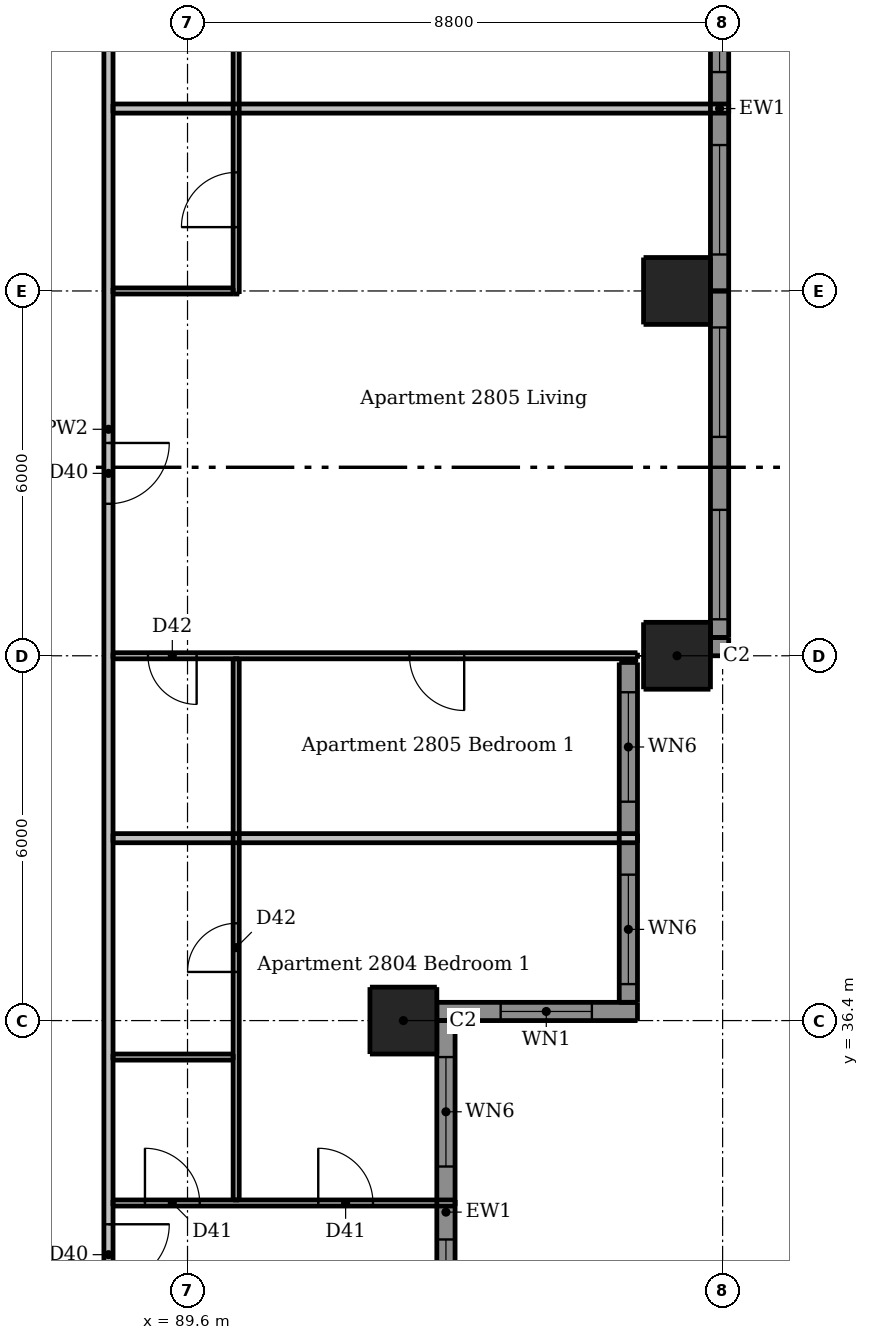
"""IFC4 building model, lengths in metres.
Left out: names, types, materials, properties, quantities, classifications, styles, units other than length and angle.
Written with IfcOpenShell. Run it as: python <this file> out.ifc"""

import sys

from ifc_helpers import new_model, si_unit, direction, frame, frame_2d, origin, origin_2d, place, context, subcontext, project, spatial, rectangle, extrude, element, fill, save


model = new_model("IFC4")
c1 = context("Model", 3, precision=1e-05, world=origin(), true_north=direction((0.0, 1.0)))
c2 = subcontext(c1, "Body", "Model", "MODEL_VIEW")
j1 = project(units=[si_unit("LENGTHUNIT", "METRE"), si_unit("PLANEANGLEUNIT", "RADIAN")], contexts=[c1])
p1 = place(None, origin())
s1 = spatial("IfcSite", under=j1, at=p1, CompositionType="ELEMENT")
p2 = place(p1, origin())
s2 = spatial("IfcBuilding", under=s1, at=p2, CompositionType="ELEMENT")
p3 = place(p2, frame((0.0, 0.0, 105.1)))
s3 = spatial("IfcBuildingStorey", under=s2, at=p3, CompositionType="ELEMENT", Elevation=105.1)
p4 = place(p3, frame((93.15, 36.4, 0.0), z_axis=(0.0, 0.0, 1.0), x_axis=(1.0, 0.0, 0.0)))
e1 = element("IfcColumn", 1, at=p4, inside=s3, PredefinedType="COLUMN", context=c2, shape_type="SweptSolid", body=[
    extrude(rectangle(XDim=1.1, YDim=1.1, at=origin_2d()), origin(), (0.0, 0.0, 1.0), 3.05),
])
for number, where, z_axis, x_axis in (
    (2, (97.65, 42.4, 0.0), (0.0, 0.0, 1.0), (1.0, 0.0, 0.0)),
    (3, (97.65, 48.4, 0.0), (0.0, 0.0, 1.0), (1.0, 0.0, 0.0)),
):
    element("IfcColumn", number, at=place(p3, frame(where, z_axis=z_axis, x_axis=x_axis)), inside=s3, PredefinedType="COLUMN", context=c2, shape_type="SweptSolid", body=[
        extrude(rectangle(XDim=1.1, YDim=1.1, at=origin_2d()), origin(), (0.0, 0.0, 1.0), 3.3),
    ])
p5 = place(p3, frame((93.7, 36.55, 0.0), z_axis=(0.0, 0.0, 1.0), x_axis=(1.0, 0.0, 0.0)))
e4 = element("IfcWall", 4, at=p5, inside=s3, PredefinedType="SOLIDWALL", context=c2, shape_type="SweptSolid", body=[
    extrude(rectangle(XDim=3.3, YDim=0.3, at=frame_2d((1.65, 0.0))), origin(), (0.0, 0.0, 1.0), 3.05),
])
p6 = place(p5, frame((1.05, 0.0, 0.9)))
e5 = element("IfcOpeningElement", 5, at=p6, cuts=e4, PredefinedType="OPENING", context=c2, shape_type="SweptSolid", body=[
    extrude(rectangle(XDim=1.5, YDim=1.5, at=frame_2d((0.75, 0.75))), frame((0.0, 0.16, 0.0), z_axis=(0.0, -1.0, 0.0), x_axis=(1.0, 0.0, 0.0)), (0.0, 0.0, 1.0), 0.32),
])
p7 = place(p3, frame((98.2, 42.55, 0.0), z_axis=(0.0, 0.0, 1.0), x_axis=(1.0, 0.0, 0.0)))
e6 = element("IfcWall", 6, at=p7, inside=s3, PredefinedType="SOLIDWALL", context=c2, shape_type="SweptSolid", body=[
    extrude(rectangle(XDim=0.3, YDim=0.3, at=frame_2d((0.15, 0.0))), origin(), (0.0, 0.0, 1.0), 3.05),
])
p8 = place(p3, frame((93.85, 30.1, 0.0), z_axis=(0.0, 0.0, 1.0), x_axis=(0.0, 1.0, 0.0)))
e7 = element("IfcWall", 7, at=p8, inside=s3, PredefinedType="SOLIDWALL", context=c2, shape_type="SweptSolid", body=[
    extrude(rectangle(XDim=6.3, YDim=0.3, at=frame_2d((3.15, 0.0))), origin(), (0.0, 0.0, 1.0), 3.05),
])
p9 = place(p8, frame((0.9, 0.0, 0.15)))
e8 = element("IfcOpeningElement", 8, at=p9, cuts=e7, PredefinedType="OPENING", context=c2, shape_type="SweptSolid", body=[
    extrude(rectangle(XDim=1.8, YDim=2.1, at=frame_2d((0.9, 1.05))), frame((0.0, 0.16, 0.0), z_axis=(0.0, -1.0, 0.0), x_axis=(1.0, 0.0, 0.0)), (0.0, 0.0, 1.0), 0.32),
])
p10 = place(p8, frame((3.9, 0.0, 0.15)))
e9 = element("IfcOpeningElement", 9, at=p10, cuts=e7, PredefinedType="OPENING", context=c2, shape_type="SweptSolid", body=[
    extrude(rectangle(XDim=1.8, YDim=2.1, at=frame_2d((0.9, 1.05))), frame((0.0, 0.16, 0.0), z_axis=(0.0, -1.0, 0.0), x_axis=(1.0, 0.0, 0.0)), (0.0, 0.0, 1.0), 0.32),
])
p11 = place(p3, frame((96.85, 36.7, 0.0), z_axis=(0.0, 0.0, 1.0), x_axis=(0.0, 1.0, 0.0)))
e10 = element("IfcWall", 10, at=p11, inside=s3, PredefinedType="SOLIDWALL", context=c2, shape_type="SweptSolid", body=[
    extrude(rectangle(XDim=5.59, YDim=0.3, at=frame_2d((2.795, 0.0))), origin(), (0.0, 0.0, 1.0), 3.05),
])
p12 = place(p11, frame((0.3, 0.0, 0.15)))
e11 = element("IfcOpeningElement", 11, at=p12, cuts=e10, PredefinedType="OPENING", context=c2, shape_type="SweptSolid", body=[
    extrude(rectangle(XDim=1.8, YDim=2.1, at=frame_2d((0.9, 1.05))), frame((0.0, 0.16, 0.0), z_axis=(0.0, -1.0, 0.0), x_axis=(1.0, 0.0, 0.0)), (0.0, 0.0, 1.0), 0.32),
])
p13 = place(p11, frame((3.3, 0.0, 0.15)))
e12 = element("IfcOpeningElement", 12, at=p13, cuts=e10, PredefinedType="OPENING", context=c2, shape_type="SweptSolid", body=[
    extrude(rectangle(XDim=1.8, YDim=2.1, at=frame_2d((0.9, 1.05))), frame((0.0, 0.16, 0.0), z_axis=(0.0, -1.0, 0.0), x_axis=(1.0, 0.0, 0.0)), (0.0, 0.0, 1.0), 0.32),
])
p14 = place(p3, frame((98.35, 42.7, 0.0), z_axis=(0.0, 0.0, 1.0), x_axis=(0.0, 1.0, 0.0)))
e13 = element("IfcWall", 13, at=p14, inside=s3, PredefinedType="SOLIDWALL", context=c2, shape_type="SweptSolid", body=[
    extrude(rectangle(XDim=5.7, YDim=0.3, at=frame_2d((2.85, 0.0))), origin(), (0.0, 0.0, 1.0), 3.05),
])
p15 = place(p14, frame((0.3, 0.0, 0.15)))
e14 = element("IfcOpeningElement", 14, at=p15, cuts=e13, PredefinedType="OPENING", context=c2, shape_type="SweptSolid", body=[
    extrude(rectangle(XDim=1.8, YDim=2.1, at=frame_2d((0.9, 1.05))), frame((0.0, 0.16, 0.0), z_axis=(0.0, -1.0, 0.0), x_axis=(1.0, 0.0, 0.0)), (0.0, 0.0, 1.0), 0.32),
])
p16 = place(p14, frame((3.3, 0.0, 0.15)))
e15 = element("IfcOpeningElement", 15, at=p16, cuts=e13, PredefinedType="OPENING", context=c2, shape_type="SweptSolid", body=[
    extrude(rectangle(XDim=1.8, YDim=2.1, at=frame_2d((0.9, 1.05))), frame((0.0, 0.16, 0.0), z_axis=(0.0, -1.0, 0.0), x_axis=(1.0, 0.0, 0.0)), (0.0, 0.0, 1.0), 0.32),
])
p17 = place(p3, frame((98.35, 48.4, 0.0), z_axis=(0.0, 0.0, 1.0), x_axis=(0.0, 1.0, 0.0)))
e16 = element("IfcWall", 16, at=p17, inside=s3, PredefinedType="SOLIDWALL", context=c2, shape_type="SweptSolid", body=[
    extrude(rectangle(XDim=6.0, YDim=0.3, at=frame_2d((3.0, 0.0))), origin(), (0.0, 0.0, 1.0), 3.05),
])
p18 = place(p17, frame((0.6, 0.0, 0.15)))
e17 = element("IfcOpeningElement", 17, at=p18, cuts=e16, PredefinedType="OPENING", context=c2, shape_type="SweptSolid", body=[
    extrude(rectangle(XDim=1.8, YDim=2.1, at=frame_2d((0.9, 1.05))), frame((0.0, 0.16, 0.0), z_axis=(0.0, -1.0, 0.0), x_axis=(1.0, 0.0, 0.0)), (0.0, 0.0, 1.0), 0.32),
])
p19 = place(p17, frame((3.6, 0.0, 0.15)))
e18 = element("IfcOpeningElement", 18, at=p19, cuts=e16, PredefinedType="OPENING", context=c2, shape_type="SweptSolid", body=[
    extrude(rectangle(XDim=1.8, YDim=2.1, at=frame_2d((0.9, 1.05))), frame((0.0, 0.16, 0.0), z_axis=(0.0, -1.0, 0.0), x_axis=(1.0, 0.0, 0.0)), (0.0, 0.0, 1.0), 0.32),
])
p20 = place(p3, frame((90.4, 33.45, 0.0), z_axis=(0.0, 0.0, 1.0), x_axis=(0.0, 1.0, 0.0)))
e19 = element("IfcWall", 19, at=p20, inside=s3, PredefinedType="PARTITIONING", context=c2, shape_type="SweptSolid", body=[
    extrude(rectangle(XDim=8.9, YDim=0.1, at=frame_2d((4.45, 0.0))), origin(), (0.0, 0.0, 1.0), 3.05),
])
p21 = place(p20, frame((3.75, 0.0, 0.0)))
e20 = element("IfcOpeningElement", 20, at=p21, cuts=e19, PredefinedType="OPENING", context=c2, shape_type="SweptSolid", body=[
    extrude(rectangle(XDim=0.8, YDim=2.1, at=frame_2d((0.4, 1.05))), frame((0.0, 0.06, 0.0), z_axis=(0.0, -1.0, 0.0), x_axis=(1.0, 0.0, 0.0)), (0.0, 0.0, 1.0), 0.12),
])
p22 = place(p3, frame((90.4, 48.35, 0.0), z_axis=(0.0, 0.0, 1.0), x_axis=(0.0, 1.0, 0.0)))
e21 = element("IfcWall", 21, at=p22, inside=s3, PredefinedType="PARTITIONING", context=c2, shape_type="SweptSolid", body=[
    extrude(rectangle(XDim=6.0, YDim=0.1, at=frame_2d((3.0, 0.0))), origin(), (0.0, 0.0, 1.0), 3.05),
])
p23 = place(p22, frame((1.1, 0.0, 0.0)))
e22 = element("IfcOpeningElement", 22, at=p23, cuts=e21, PredefinedType="OPENING", context=c2, shape_type="SweptSolid", body=[
    extrude(rectangle(XDim=0.9, YDim=2.1, at=frame_2d((0.45, 1.05))), frame((0.0, 0.06, 0.0), z_axis=(0.0, -1.0, 0.0), x_axis=(1.0, 0.0, 0.0)), (0.0, 0.0, 1.0), 0.12),
])
p24 = place(p3, frame((88.375, 48.4, 0.0), z_axis=(0.0, 0.0, 1.0), x_axis=(1.0, 0.0, 0.0)))
e23 = element("IfcWall", 23, at=p24, inside=s3, PredefinedType="PARTITIONING", context=c2, shape_type="SweptSolid", body=[
    extrude(rectangle(XDim=1.975, YDim=0.1, at=frame_2d((0.988, 0.0))), origin(), (0.0, 0.0, 1.0), 2.516),
])
p25 = place(p3, frame((97.0, 42.4, 0.0), z_axis=(0.0, 0.0, 1.0), x_axis=(-1.0, 0.0, 0.0)))
e24 = element("IfcWall", 24, at=p25, inside=s3, PredefinedType="PARTITIONING", context=c2, shape_type="SweptSolid", body=[
    extrude(rectangle(XDim=8.625, YDim=0.1, at=frame_2d((4.312, 0.0))), origin(), (0.0, 0.0, 1.0), 2.516),
])
p26 = place(p25, frame((2.85, 0.0, 0.0)))
e25 = element("IfcOpeningElement", 25, at=p26, cuts=e24, PredefinedType="OPENING", context=c2, shape_type="SweptSolid", body=[
    extrude(rectangle(XDim=0.9, YDim=2.1, at=frame_2d((0.45, 1.05))), frame((0.0, 0.06, 0.0), z_axis=(0.0, -1.0, 0.0), x_axis=(1.0, 0.0, 0.0)), (0.0, 0.0, 1.0), 0.12),
])
p27 = place(p25, frame((7.25, 0.0, 0.0)))
e26 = element("IfcOpeningElement", 26, at=p27, cuts=e24, PredefinedType="OPENING", context=c2, shape_type="SweptSolid", body=[
    extrude(rectangle(XDim=0.8, YDim=2.1, at=frame_2d((0.4, 1.05))), frame((0.0, 0.06, 0.0), z_axis=(0.0, -1.0, 0.0), x_axis=(1.0, 0.0, 0.0)), (0.0, 0.0, 1.0), 0.12),
])
p28 = place(p3, frame((88.375, 35.8, 0.0), z_axis=(0.0, 0.0, 1.0), x_axis=(1.0, 0.0, 0.0)))
e27 = element("IfcWall", 27, at=p28, inside=s3, PredefinedType="PARTITIONING", context=c2, shape_type="SweptSolid", body=[
    extrude(rectangle(XDim=1.975, YDim=0.1, at=frame_2d((0.988, 0.0))), origin(), (0.0, 0.0, 1.0), 3.05),
])
p29 = place(p3, frame((88.375, 33.4, 0.0), z_axis=(0.0, 0.0, 1.0), x_axis=(1.0, 0.0, 0.0)))
e28 = element("IfcWall", 28, at=p29, inside=s3, PredefinedType="PARTITIONING", context=c2, shape_type="SweptSolid", body=[
    extrude(rectangle(XDim=5.625, YDim=0.1, at=frame_2d((2.812, 0.0))), origin(), (0.0, 0.0, 1.0), 3.05),
])
p30 = place(p29, frame((0.525, 0.0, 0.0)))
e29 = element("IfcOpeningElement", 29, at=p30, cuts=e28, PredefinedType="OPENING", context=c2, shape_type="SweptSolid", body=[
    extrude(rectangle(XDim=0.9, YDim=2.1, at=frame_2d((0.45, 1.05))), frame((0.0, 0.06, 0.0), z_axis=(0.0, -1.0, 0.0), x_axis=(1.0, 0.0, 0.0)), (0.0, 0.0, 1.0), 0.12),
])
p31 = place(p29, frame((3.375, 0.0, 0.0)))
e30 = element("IfcOpeningElement", 30, at=p31, cuts=e28, PredefinedType="OPENING", context=c2, shape_type="SweptSolid", body=[
    extrude(rectangle(XDim=0.9, YDim=2.1, at=frame_2d((0.45, 1.05))), frame((0.0, 0.06, 0.0), z_axis=(0.0, -1.0, 0.0), x_axis=(1.0, 0.0, 0.0)), (0.0, 0.0, 1.0), 0.12),
])
p32 = place(p3, frame((88.3, 60.475, 0.0), z_axis=(0.0, 0.0, 1.0), x_axis=(0.0, -1.0, 0.0)))
e31 = element("IfcWall", 31, at=p32, inside=s3, PredefinedType="PARTITIONING", context=c2, shape_type="SweptSolid", body=[
    extrude(rectangle(XDim=28.7, YDim=0.15, at=frame_2d((14.35, 0.0))), origin(), (0.0, 0.0, 1.0), 3.05),
])
p33 = place(p32, frame((27.425, 0.0, 0.0)))
e32 = element("IfcOpeningElement", 32, at=p33, cuts=e31, PredefinedType="OPENING", context=c2, shape_type="SweptSolid", body=[
    extrude(rectangle(XDim=1.0, YDim=2.1, at=frame_2d((0.5, 1.05))), frame((0.0, 0.085, 0.0), z_axis=(0.0, -1.0, 0.0), x_axis=(1.0, 0.0, 0.0)), (0.0, 0.0, 1.0), 0.17),
])
p34 = place(p32, frame((14.575, 0.0, 0.0)))
e33 = element("IfcOpeningElement", 33, at=p34, cuts=e31, PredefinedType="OPENING", context=c2, shape_type="SweptSolid", body=[
    extrude(rectangle(XDim=1.0, YDim=2.1, at=frame_2d((0.5, 1.05))), frame((0.0, 0.085, 0.0), z_axis=(0.0, -1.0, 0.0), x_axis=(1.0, 0.0, 0.0)), (0.0, 0.0, 1.0), 0.17),
])
p35 = place(p32, frame((3.775, 0.0, 0.0)))
e34 = element("IfcOpeningElement", 34, at=p35, cuts=e31, PredefinedType="OPENING", context=c2, shape_type="SweptSolid", body=[
    extrude(rectangle(XDim=1.0, YDim=2.1, at=frame_2d((0.5, 1.05))), frame((0.0, 0.085, 0.0), z_axis=(0.0, -1.0, 0.0), x_axis=(1.0, 0.0, 0.0)), (0.0, 0.0, 1.0), 0.17),
])
p36 = place(p3, frame((88.375, 51.4, 0.0), z_axis=(0.0, 0.0, 1.0), x_axis=(1.0, 0.0, 0.0)))
e35 = element("IfcWall", 35, at=p36, inside=s3, PredefinedType="PARTITIONING", context=c2, shape_type="SweptSolid", body=[
    extrude(rectangle(XDim=10.125, YDim=0.15, at=frame_2d((5.062, 0.0))), origin(), (0.0, 0.0, 1.0), 3.05),
])
p37 = place(p3, frame((88.375, 39.4, 0.0), z_axis=(0.0, 0.0, 1.0), x_axis=(1.0, 0.0, 0.0)))
e36 = element("IfcWall", 36, at=p37, inside=s3, PredefinedType="PARTITIONING", context=c2, shape_type="SweptSolid", body=[
    extrude(rectangle(XDim=8.625, YDim=0.15, at=frame_2d((4.312, 0.0))), origin(), (0.0, 0.0, 1.0), 3.05),
])
p38 = place(p6, origin())
e37 = element("IfcWindow", 37, at=p38, inside=s3, PartitioningType="DOUBLE_PANEL_VERTICAL", PredefinedType="WINDOW", context=c2, shape_type="SweptSolid", body=[
    extrude(rectangle(XDim=1.5, YDim=1.5, at=frame_2d((0.75, 0.75))), frame((0.0, 0.03, 0.0), z_axis=(0.0, -1.0, 0.0), x_axis=(1.0, 0.0, 0.0)), (0.0, 0.0, 1.0), 0.06),
])
fill(e5, e37)
p39 = place(p9, origin())
e38 = element("IfcWindow", 38, at=p39, inside=s3, PartitioningType="DOUBLE_PANEL_VERTICAL", PredefinedType="WINDOW", context=c2, shape_type="SweptSolid", body=[
    extrude(rectangle(XDim=1.8, YDim=2.1, at=frame_2d((0.9, 1.05))), frame((0.0, 0.03, 0.0), z_axis=(0.0, -1.0, 0.0), x_axis=(1.0, 0.0, 0.0)), (0.0, 0.0, 1.0), 0.06),
])
fill(e8, e38)
p40 = place(p10, origin())
e39 = element("IfcWindow", 39, at=p40, inside=s3, PartitioningType="DOUBLE_PANEL_VERTICAL", PredefinedType="WINDOW", context=c2, shape_type="SweptSolid", body=[
    extrude(rectangle(XDim=1.8, YDim=2.1, at=frame_2d((0.9, 1.05))), frame((0.0, 0.03, 0.0), z_axis=(0.0, -1.0, 0.0), x_axis=(1.0, 0.0, 0.0)), (0.0, 0.0, 1.0), 0.06),
])
fill(e9, e39)
p41 = place(p12, origin())
e40 = element("IfcWindow", 40, at=p41, inside=s3, PartitioningType="DOUBLE_PANEL_VERTICAL", PredefinedType="WINDOW", context=c2, shape_type="SweptSolid", body=[
    extrude(rectangle(XDim=1.8, YDim=2.1, at=frame_2d((0.9, 1.05))), frame((0.0, 0.03, 0.0), z_axis=(0.0, -1.0, 0.0), x_axis=(1.0, 0.0, 0.0)), (0.0, 0.0, 1.0), 0.06),
])
fill(e11, e40)
p42 = place(p13, origin())
e41 = element("IfcWindow", 41, at=p42, inside=s3, PartitioningType="DOUBLE_PANEL_VERTICAL", PredefinedType="WINDOW", context=c2, shape_type="SweptSolid", body=[
    extrude(rectangle(XDim=1.8, YDim=2.1, at=frame_2d((0.9, 1.05))), frame((0.0, 0.03, 0.0), z_axis=(0.0, -1.0, 0.0), x_axis=(1.0, 0.0, 0.0)), (0.0, 0.0, 1.0), 0.06),
])
fill(e12, e41)
p43 = place(p15, origin())
e42 = element("IfcWindow", 42, at=p43, inside=s3, PartitioningType="DOUBLE_PANEL_VERTICAL", PredefinedType="WINDOW", context=c2, shape_type="SweptSolid", body=[
    extrude(rectangle(XDim=1.8, YDim=2.1, at=frame_2d((0.9, 1.05))), frame((0.0, 0.03, 0.0), z_axis=(0.0, -1.0, 0.0), x_axis=(1.0, 0.0, 0.0)), (0.0, 0.0, 1.0), 0.06),
])
fill(e14, e42)
p44 = place(p16, origin())
e43 = element("IfcWindow", 43, at=p44, inside=s3, PartitioningType="DOUBLE_PANEL_VERTICAL", PredefinedType="WINDOW", context=c2, shape_type="SweptSolid", body=[
    extrude(rectangle(XDim=1.8, YDim=2.1, at=frame_2d((0.9, 1.05))), frame((0.0, 0.03, 0.0), z_axis=(0.0, -1.0, 0.0), x_axis=(1.0, 0.0, 0.0)), (0.0, 0.0, 1.0), 0.06),
])
fill(e15, e43)
p45 = place(p18, origin())
e44 = element("IfcWindow", 44, at=p45, inside=s3, PartitioningType="DOUBLE_PANEL_VERTICAL", PredefinedType="WINDOW", context=c2, shape_type="SweptSolid", body=[
    extrude(rectangle(XDim=1.8, YDim=2.1, at=frame_2d((0.9, 1.05))), frame((0.0, 0.03, 0.0), z_axis=(0.0, -1.0, 0.0), x_axis=(1.0, 0.0, 0.0)), (0.0, 0.0, 1.0), 0.06),
])
fill(e17, e44)
p46 = place(p19, origin())
e45 = element("IfcWindow", 45, at=p46, inside=s3, PartitioningType="DOUBLE_PANEL_VERTICAL", PredefinedType="WINDOW", context=c2, shape_type="SweptSolid", body=[
    extrude(rectangle(XDim=1.8, YDim=2.1, at=frame_2d((0.9, 1.05))), frame((0.0, 0.03, 0.0), z_axis=(0.0, -1.0, 0.0), x_axis=(1.0, 0.0, 0.0)), (0.0, 0.0, 1.0), 0.06),
])
fill(e18, e45)
p47 = place(p33, origin())
e46 = element("IfcDoor", 46, at=p47, inside=s3, OperationType="SINGLE_SWING_LEFT", PredefinedType="DOOR", context=c2, shape_type="SweptSolid", body=[
    extrude(rectangle(XDim=1.0, YDim=2.1, at=frame_2d((0.5, 1.05))), frame((0.0, 0.025, 0.0), z_axis=(0.0, -1.0, 0.0), x_axis=(1.0, 0.0, 0.0)), (0.0, 0.0, 1.0), 0.05),
])
fill(e32, e46)
p48 = place(p30, origin())
e47 = element("IfcDoor", 47, at=p48, inside=s3, OperationType="SINGLE_SWING_LEFT", PredefinedType="DOOR", context=c2, shape_type="SweptSolid", body=[
    extrude(rectangle(XDim=0.9, YDim=2.1, at=frame_2d((0.45, 1.05))), frame((0.0, 0.025, 0.0), z_axis=(0.0, -1.0, 0.0), x_axis=(1.0, 0.0, 0.0)), (0.0, 0.0, 1.0), 0.05),
])
fill(e29, e47)
p49 = place(p31, origin())
e48 = element("IfcDoor", 48, at=p49, inside=s3, OperationType="SINGLE_SWING_LEFT", PredefinedType="DOOR", context=c2, shape_type="SweptSolid", body=[
    extrude(rectangle(XDim=0.9, YDim=2.1, at=frame_2d((0.45, 1.05))), frame((0.0, 0.025, 0.0), z_axis=(0.0, -1.0, 0.0), x_axis=(1.0, 0.0, 0.0)), (0.0, 0.0, 1.0), 0.05),
])
fill(e30, e48)
p50 = place(p21, origin())
e49 = element("IfcDoor", 49, at=p50, inside=s3, OperationType="SINGLE_SWING_LEFT", PredefinedType="DOOR", context=c2, shape_type="SweptSolid", body=[
    extrude(rectangle(XDim=0.8, YDim=2.1, at=frame_2d((0.4, 1.05))), frame((0.0, 0.025, 0.0), z_axis=(0.0, -1.0, 0.0), x_axis=(1.0, 0.0, 0.0)), (0.0, 0.0, 1.0), 0.05),
])
fill(e20, e49)
p51 = place(p34, origin())
e50 = element("IfcDoor", 50, at=p51, inside=s3, OperationType="SINGLE_SWING_LEFT", PredefinedType="DOOR", context=c2, shape_type="SweptSolid", body=[
    extrude(rectangle(XDim=1.0, YDim=2.1, at=frame_2d((0.5, 1.05))), frame((0.0, 0.025, 0.0), z_axis=(0.0, -1.0, 0.0), x_axis=(1.0, 0.0, 0.0)), (0.0, 0.0, 1.0), 0.05),
])
fill(e33, e50)
p52 = place(p23, origin())
e51 = element("IfcDoor", 51, at=p52, inside=s3, OperationType="SINGLE_SWING_LEFT", PredefinedType="DOOR", context=c2, shape_type="SweptSolid", body=[
    extrude(rectangle(XDim=0.9, YDim=2.1, at=frame_2d((0.45, 1.05))), frame((0.0, 0.025, 0.0), z_axis=(0.0, -1.0, 0.0), x_axis=(1.0, 0.0, 0.0)), (0.0, 0.0, 1.0), 0.05),
])
fill(e22, e51)
p53 = place(p26, origin())
e52 = element("IfcDoor", 52, at=p53, inside=s3, OperationType="SINGLE_SWING_LEFT", PredefinedType="DOOR", context=c2, shape_type="SweptSolid", body=[
    extrude(rectangle(XDim=0.9, YDim=2.1, at=frame_2d((0.45, 1.05))), frame((0.0, 0.025, 0.0), z_axis=(0.0, -1.0, 0.0), x_axis=(1.0, 0.0, 0.0)), (0.0, 0.0, 1.0), 0.05),
])
fill(e25, e52)
p54 = place(p27, origin())
e53 = element("IfcDoor", 53, at=p54, inside=s3, OperationType="SINGLE_SWING_LEFT", PredefinedType="DOOR", context=c2, shape_type="SweptSolid", body=[
    extrude(rectangle(XDim=0.8, YDim=2.1, at=frame_2d((0.4, 1.05))), frame((0.0, 0.025, 0.0), z_axis=(0.0, -1.0, 0.0), x_axis=(1.0, 0.0, 0.0)), (0.0, 0.0, 1.0), 0.05),
])
fill(e26, e53)
save(model, sys.argv[1])
